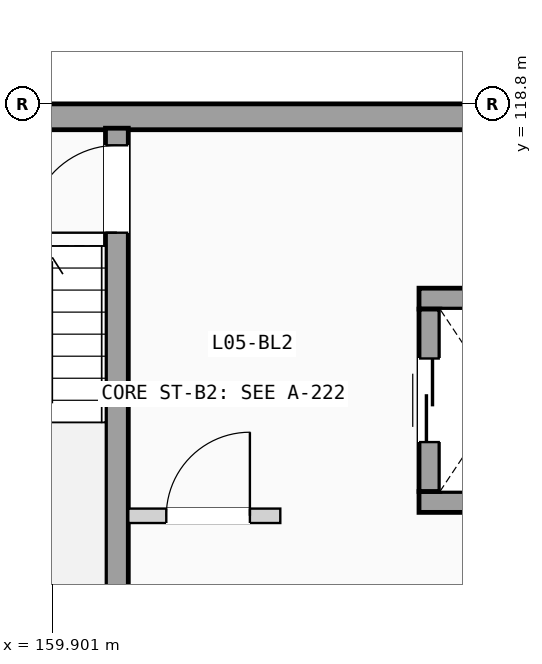
"""IFC4 building model, lengths in metres.
Left out: names, types, materials, properties, quantities, classifications, styles, units other than length and angle.
Written with IfcOpenShell. Run it as: python <this file> out.ifc"""

import sys

from ifc_helpers import new_model, si_unit, direction, frame, frame_2d, origin, place, context, subcontext, project, spatial, rectangle, extrude, element, fill, save


model = new_model("IFC4")
c1 = context("Model", 3, precision=1e-05, world=origin(), true_north=direction((0.0, 1.0)))
c2 = subcontext(c1, "Body", "Model", "MODEL_VIEW")
j1 = project(units=[si_unit("LENGTHUNIT", "METRE"), si_unit("PLANEANGLEUNIT", "RADIAN")], contexts=[c1])
p1 = place(None, origin())
s1 = spatial("IfcSite", under=j1, at=p1, CompositionType="ELEMENT")
p2 = place(p1, origin())
s2 = spatial("IfcBuilding", under=s1, at=p2, CompositionType="ELEMENT")
p3 = place(p2, frame((0.0, 0.0, 18.375)))
s3 = spatial("IfcBuildingStorey", under=s2, at=p3, CompositionType="ELEMENT", Elevation=18.375)
p4 = place(p3, frame((151.2, 118.63, 0.0), z_axis=(0.0, 0.0, 1.0), x_axis=(1.0, 0.0, 0.0)))
e1 = element("IfcWall", 1, at=p4, inside=s3, PredefinedType="SOLIDWALL", context=c2, shape_type="SweptSolid", body=[
    extrude(rectangle(XDim=21.6, YDim=0.34, at=frame_2d((10.8, 0.0))), origin(), (0.0, 0.0, 1.0), 2.89),
])
p5 = place(p3, frame((160.75, 111.48, 0.0), z_axis=(0.0, 0.0, 1.0), x_axis=(0.0, 1.0, 0.0)))
e2 = element("IfcWall", 2, at=p5, inside=s3, PredefinedType="SHEAR", context=c2, shape_type="SweptSolid", body=[
    extrude(rectangle(XDim=7.0, YDim=0.3, at=frame_2d((3.5, 0.0))), origin(), (0.0, 0.0, 1.0), 2.89),
])
p6 = place(p5, frame((5.625, 0.0, 0.0)))
e3 = element("IfcOpeningElement", 3, at=p6, cuts=e2, PredefinedType="OPENING", context=c2, shape_type="SweptSolid", body=[
    extrude(rectangle(XDim=1.15, YDim=2.12, at=frame_2d((0.575, 1.06))), frame((0.0, 0.16, 0.0), z_axis=(0.0, -1.0, 0.0), x_axis=(1.0, 0.0, 0.0)), (0.0, 0.0, 1.0), 0.32),
])
for number, where, z_axis, x_axis in (
    (4, (164.725, 113.562, 0.0), (0.0, 0.0, 1.0), (1.0, 0.0, 0.0)),
    (5, (164.725, 116.238, 0.0), (0.0, 0.0, 1.0), (1.0, 0.0, 0.0)),
):
    element("IfcWall", number, at=place(p3, frame(where, z_axis=z_axis, x_axis=x_axis)), inside=s3, PredefinedType="SHEAR", context=c2, shape_type="SweptSolid", body=[
        extrude(rectangle(XDim=2.15, YDim=0.275, at=frame_2d((1.075, 0.0))), origin(), (0.0, 0.0, 1.0), 2.89),
    ])
p7 = place(p3, frame((164.863, 113.7, 0.0), z_axis=(0.0, 0.0, 1.0), x_axis=(0.0, 1.0, 0.0)))
e6 = element("IfcWall", 6, at=p7, inside=s3, PredefinedType="SHEAR", context=c2, shape_type="SweptSolid", body=[
    extrude(rectangle(XDim=2.4, YDim=0.275, at=frame_2d((1.2, 0.0))), origin(), (0.0, 0.0, 1.0), 2.89),
])
p8 = place(p7, frame((0.65, 0.0, 0.0)))
e7 = element("IfcOpeningElement", 7, at=p8, cuts=e6, PredefinedType="OPENING", context=c2, shape_type="SweptSolid", body=[
    extrude(rectangle(XDim=1.1, YDim=2.15, at=frame_2d((0.55, 1.075))), frame((0.0, 0.147, 0.0), z_axis=(0.0, -1.0, 0.0), x_axis=(1.0, 0.0, 0.0)), (0.0, 0.0, 1.0), 0.295),
])
p9 = place(p3, frame((160.9, 113.38, 0.0), z_axis=(0.0, 0.0, 1.0), x_axis=(1.0, 0.0, 0.0)))
e8 = element("IfcWall", 8, at=p9, inside=s3, PredefinedType="PARTITIONING", context=c2, shape_type="SweptSolid", body=[
    extrude(rectangle(XDim=2.0, YDim=0.19, at=frame_2d((1.0, 0.0))), origin(), (0.0, 0.0, 1.0), 2.87),
])
p10 = place(p9, frame((0.5, 0.0, 0.0)))
e9 = element("IfcOpeningElement", 9, at=p10, cuts=e8, PredefinedType="OPENING", context=c2, shape_type="SweptSolid", body=[
    extrude(rectangle(XDim=1.1, YDim=2.12, at=frame_2d((0.55, 1.06))), frame((0.0, 0.105, 0.0), z_axis=(0.0, -1.0, 0.0), x_axis=(1.0, 0.0, 0.0)), (0.0, 0.0, 1.0), 0.21),
])
p11 = place(p6, origin())
e10 = element("IfcDoor", 10, at=p11, inside=s3, OperationType="SINGLE_SWING_LEFT", PredefinedType="DOOR", context=c2, shape_type="SweptSolid", body=[
    extrude(rectangle(XDim=1.15, YDim=2.12, at=frame_2d((0.575, 1.06))), frame((0.0, 0.025, 0.0), z_axis=(0.0, -1.0, 0.0), x_axis=(1.0, 0.0, 0.0)), (0.0, 0.0, 1.0), 0.05),
])
fill(e3, e10)
p12 = place(p8, origin())
e11 = element("IfcDoor", 11, at=p12, inside=s3, OperationType="SLIDING_TO_LEFT", PredefinedType="DOOR", context=c2, shape_type="SweptSolid", body=[
    extrude(rectangle(XDim=1.1, YDim=2.15, at=frame_2d((0.55, 1.075))), frame((0.0, 0.025, 0.0), z_axis=(0.0, -1.0, 0.0), x_axis=(1.0, 0.0, 0.0)), (0.0, 0.0, 1.0), 0.05),
])
fill(e7, e11)
p13 = place(p10, origin())
e12 = element("IfcDoor", 12, at=p13, inside=s3, OperationType="SINGLE_SWING_RIGHT", PredefinedType="DOOR", context=c2, shape_type="SweptSolid", body=[
    extrude(rectangle(XDim=1.1, YDim=2.12, at=frame_2d((0.55, 1.06))), frame((0.0, 0.025, 0.0), z_axis=(0.0, -1.0, 0.0), x_axis=(1.0, 0.0, 0.0)), (0.0, 0.0, 1.0), 0.05),
])
fill(e9, e12)
save(model, sys.argv[1])
